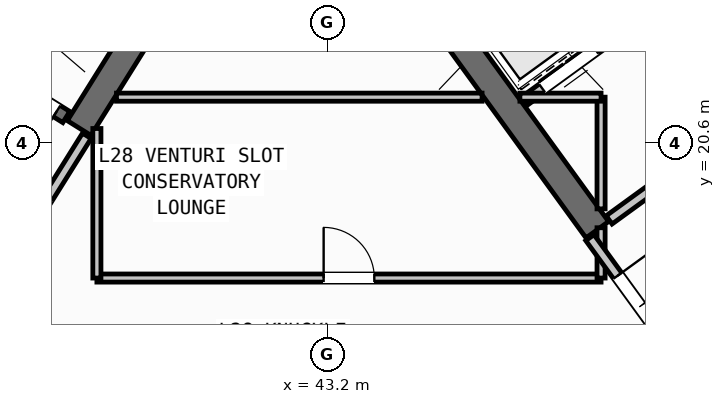
"""IFC4 building model, lengths in metres.
Left out: names, types, materials, properties, quantities, classifications, styles, units other than length and angle.
Written with IfcOpenShell. Run it as: python <this file> out.ifc"""

import sys

from ifc_helpers import new_model, si_unit, direction, frame, frame_2d, origin, place, context, subcontext, project, spatial, rectangle, extrude, source, transform, mapped, element, fill, save


model = new_model("IFC4")
c1 = context("Model", 3, precision=1e-05, world=origin(), true_north=direction((0.0, 1.0)))
c2 = subcontext(c1, "Body", "Model", "MODEL_VIEW")
j1 = project(units=[si_unit("LENGTHUNIT", "METRE"), si_unit("PLANEANGLEUNIT", "RADIAN")], contexts=[c1])
p1 = place(None, origin())
s1 = spatial("IfcSite", under=j1, at=p1, CompositionType="ELEMENT")
p2 = place(p1, origin())
s2 = spatial("IfcBuilding", under=s1, at=p2, CompositionType="ELEMENT")
p3 = place(p2, frame((0.0, 0.0, 112.5)))
s3 = spatial("IfcBuildingStorey", under=s2, at=p3, CompositionType="ELEMENT", Elevation=112.5)
p4 = place(p3, frame((40.194, 23.922, 0.0), z_axis=(0.0, 0.0, 1.0), x_axis=(-0.529888438328, -0.848067357541, 0.0)))
e1 = element("IfcWall", 1, at=p4, inside=s3, PredefinedType="SHEAR", context=c2, shape_type="SweptSolid", body=[
    extrude(rectangle(XDim=3.575, YDim=0.55, at=frame_2d((1.788, 0.0))), origin(), (0.0, 0.0, 1.0), 3.35),
])
p5 = place(p3, frame((48.526, 18.884, 0.0), z_axis=(0.0, 0.0, 1.0), x_axis=(-0.587764933797, 0.809031756236, 0.0)))
e2 = element("IfcWall", 2, at=p5, inside=s3, PredefinedType="SHEAR", context=c2, shape_type="SweptSolid", body=[
    extrude(rectangle(XDim=6.425, YDim=0.55, at=frame_2d((3.212, 0.0))), origin(), (0.0, 0.0, 1.0), 3.35),
])
p6 = place(p3, frame((38.046, 21.108, 0.0), z_axis=(0.0, 0.0, 1.0), x_axis=(-0.848054434086, 0.529909121291, 0.0)))
e3 = element("IfcWall", 3, at=p6, inside=s3, PredefinedType="SHEAR", context=c2, shape_type="SweptSolid", body=[
    extrude(rectangle(XDim=7.33, YDim=0.26, at=frame_2d((3.665, 0.0))), origin(), (0.0, 0.0, 1.0), 3.35),
])
p7 = place(p6, frame((0.22, 0.0, 0.0)))
e4 = element("IfcOpeningElement", 4, at=p7, cuts=e3, PredefinedType="OPENING", context=c2, shape_type="SweptSolid", body=[
    extrude(rectangle(XDim=1.1, YDim=2.1, at=frame_2d((0.55, 1.05))), frame((0.0, 0.14, 0.0), z_axis=(0.0, -1.0, 0.0), x_axis=(1.0, 0.0, 0.0)), (0.0, 0.0, 1.0), 0.28),
])
p8 = place(p3, frame((47.065, 21.407, 0.0), z_axis=(0.0, 0.0, 1.0), x_axis=(0.809032984992, 0.587763242466, 0.0)))
e5 = element("IfcWall", 5, at=p8, inside=s3, PredefinedType="STANDARD", context=c2, shape_type="SweptSolid", body=[
    extrude(rectangle(XDim=3.448, YDim=0.2, at=frame_2d((1.724, 0.0))), origin(), (0.0, 0.0, 1.0), 3.34),
])
p9 = place(p8, frame((0.458, 0.0, 0.0)))
e6 = element("IfcOpeningElement", 6, at=p9, cuts=e5, PredefinedType="OPENING", context=c2, shape_type="SweptSolid", body=[
    extrude(rectangle(XDim=1.3, YDim=2.2, at=frame_2d((0.65, 1.1))), frame((0.0, 0.11, 0.0), z_axis=(0.0, -1.0, 0.0), x_axis=(1.0, 0.0, 0.0)), (0.0, 0.0, 1.0), 0.22),
])
p10 = place(p3, frame((48.758, 19.077, 0.0), z_axis=(0.0, 0.0, 1.0), x_axis=(0.809005065155, 0.587801671104, 0.0)))
e7 = element("IfcWall", 7, at=p10, inside=s3, PredefinedType="STANDARD", context=c2, shape_type="SweptSolid", body=[
    extrude(rectangle(XDim=5.768, YDim=0.2, at=frame_2d((2.884, 0.0))), origin(), (0.0, 0.0, 1.0), 3.34),
])
p11 = place(p10, frame((2.548, 0.0, 0.0)))
e8 = element("IfcOpeningElement", 8, at=p11, cuts=e7, PredefinedType="OPENING", context=c2, shape_type="SweptSolid", body=[
    extrude(rectangle(XDim=1.15, YDim=2.1, at=frame_2d((0.575, 1.05))), frame((0.0, 0.11, 0.0), z_axis=(0.0, -1.0, 0.0), x_axis=(1.0, 0.0, 0.0)), (0.0, 0.0, 1.0), 0.22),
])
p12 = place(p3, frame((38.451, 20.737, 0.0), z_axis=(0.0, 0.0, 1.0), x_axis=(-0.529924799939, -0.848044637038, 0.0)))
e9 = element("IfcWall", 9, at=p12, inside=s3, PredefinedType="STANDARD", context=c2, shape_type="SweptSolid", body=[
    extrude(rectangle(XDim=2.96, YDim=0.2, at=frame_2d((1.48, 0.0))), origin(), (0.0, 0.0, 1.0), 3.34),
])
p13 = place(p12, frame((1.46, 0.0, 0.0)))
e10 = element("IfcOpeningElement", 10, at=p13, cuts=e9, PredefinedType="OPENING", context=c2, shape_type="SweptSolid", body=[
    extrude(rectangle(XDim=0.86, YDim=2.05, at=frame_2d((0.43, 1.025))), frame((0.0, 0.11, 0.0), z_axis=(0.0, -1.0, 0.0), x_axis=(1.0, 0.0, 0.0)), (0.0, 0.0, 1.0), 0.22),
])
p14 = place(p3, frame((38.65, 17.93, 0.0), z_axis=(0.0, 0.0, 1.0), x_axis=(1.0, 0.0, 0.0)))
e11 = element("IfcWall", 11, at=p14, inside=s3, PredefinedType="PARTITIONING", context=c2, shape_type="SweptSolid", body=[
    extrude(rectangle(XDim=9.95, YDim=0.16, at=frame_2d((4.975, 0.0))), origin(), (0.0, 0.0, 1.0), 3.34),
])
p15 = place(p14, frame((4.475, 0.0, 0.0)))
e12 = element("IfcOpeningElement", 12, at=p15, cuts=e11, PredefinedType="OPENING", context=c2, shape_type="SweptSolid", body=[
    extrude(rectangle(XDim=1.0, YDim=2.1, at=frame_2d((0.5, 1.05))), frame((0.0, 0.09, 0.0), z_axis=(0.0, -1.0, 0.0), x_axis=(1.0, 0.0, 0.0)), (0.0, 0.0, 1.0), 0.18),
])
p16 = place(p3, frame((38.65, 17.93, 0.0), z_axis=(0.0, 0.0, 1.0), x_axis=(0.0, 1.0, 0.0)))
e13 = element("IfcWall", 13, at=p16, inside=s3, PredefinedType="PARTITIONING", context=c2, shape_type="SweptSolid", body=[
    extrude(rectangle(XDim=2.951, YDim=0.16, at=frame_2d((1.476, 0.0))), origin(), (0.0, 0.0, 1.0), 3.34),
])
p17 = place(p3, frame((48.6, 17.93, 0.0), z_axis=(0.0, 0.0, 1.0), x_axis=(0.0, 1.0, 0.0)))
e14 = element("IfcWall", 14, at=p17, inside=s3, PredefinedType="PARTITIONING", context=c2, shape_type="SweptSolid", body=[
    extrude(rectangle(XDim=0.993, YDim=0.16, at=frame_2d((0.496, 0.0))), origin(), (0.0, 0.0, 1.0), 3.34),
])
p18 = place(p3, frame((48.6, 19.295, 0.0), z_axis=(0.0, 0.0, 1.0), x_axis=(0.0, 1.0, 0.0)))
e15 = element("IfcWall", 15, at=p18, inside=s3, PredefinedType="PARTITIONING", context=c2, shape_type="SweptSolid", body=[
    extrude(rectangle(XDim=2.205, YDim=0.16, at=frame_2d((1.103, 0.0))), origin(), (0.0, 0.0, 1.0), 3.34),
])
p19 = place(p3, frame((39.037, 21.5, 0.0), z_axis=(0.0, 0.0, 1.0), x_axis=(1.0, 0.0, 0.0)))
e16 = element("IfcWall", 16, at=p19, inside=s3, PredefinedType="PARTITIONING", context=c2, shape_type="SweptSolid", body=[
    extrude(rectangle(XDim=7.215, YDim=0.16, at=frame_2d((3.607, 0.0))), origin(), (0.0, 0.0, 1.0), 3.34),
])
p20 = place(p3, frame((46.998, 21.5, 0.0), z_axis=(0.0, 0.0, 1.0), x_axis=(1.0, 0.0, 0.0)))
e17 = element("IfcWall", 17, at=p20, inside=s3, PredefinedType="PARTITIONING", context=c2, shape_type="SweptSolid", body=[
    extrude(rectangle(XDim=1.602, YDim=0.16, at=frame_2d((0.801, 0.0))), origin(), (0.0, 0.0, 1.0), 3.34),
])
p21 = place(p3, frame((50.119, 16.333, 0.0), z_axis=(0.0, 0.0, 1.0), x_axis=(-0.587749856981, 0.809042709391, 0.0)))
e18 = element("IfcWall", 18, at=p21, inside=s3, PredefinedType="STANDARD", context=c2, shape_type="SweptSolid", body=[
    extrude(rectangle(XDim=2.96, YDim=0.2, at=frame_2d((1.48, 0.0))), origin(), (0.0, 0.0, 1.0), 3.34),
])
p22 = place(p21, frame((0.53, 0.0, 0.0)))
e19 = element("IfcOpeningElement", 19, at=p22, cuts=e18, PredefinedType="OPENING", context=c2, shape_type="SweptSolid", body=[
    extrude(rectangle(XDim=1.5, YDim=2.15, at=frame_2d((0.75, 1.075))), frame((0.0, 0.11, 0.0), z_axis=(0.0, -1.0, 0.0), x_axis=(1.0, 0.0, 0.0)), (0.0, 0.0, 1.0), 0.22),
])
m1 = source(origin(), c2, "Body", "SweptSolid", [
    extrude(rectangle(XDim=1.1, YDim=2.1, at=frame_2d((0.55, 1.05))), frame((0.0, 0.025, 0.0), z_axis=(0.0, -1.0, 0.0), x_axis=(1.0, 0.0, 0.0)), (0.0, 0.0, 1.0), 0.05),
])
p23 = place(p7, origin())
e20 = element("IfcDoor", 20, at=p23, inside=s3, OperationType="SINGLE_SWING_LEFT", PredefinedType="DOOR", context=c2, shape_type="MappedRepresentation", body=[
    mapped(m1, transform((0.0, 0.0, 0.0), scale=1.0)),
])
fill(e4, e20)
m2 = source(origin(), c2, "Body", "SweptSolid", [
    extrude(rectangle(XDim=1.3, YDim=2.2, at=frame_2d((0.65, 1.1))), frame((0.0, 0.025, 0.0), z_axis=(0.0, -1.0, 0.0), x_axis=(1.0, 0.0, 0.0)), (0.0, 0.0, 1.0), 0.05),
])
p24 = place(p9, origin())
e21 = element("IfcDoor", 21, at=p24, inside=s3, OperationType="DOUBLE_DOOR_SLIDING", PredefinedType="DOOR", context=c2, shape_type="MappedRepresentation", body=[
    mapped(m2, transform((0.0, 0.0, 0.0), scale=1.0)),
])
fill(e6, e21)
m3 = source(origin(), c2, "Body", "SweptSolid", [
    extrude(rectangle(XDim=1.0, YDim=2.1, at=frame_2d((0.5, 1.05))), frame((0.0, 0.025, 0.0), z_axis=(0.0, -1.0, 0.0), x_axis=(1.0, 0.0, 0.0)), (0.0, 0.0, 1.0), 0.05),
])
p25 = place(p15, origin())
e22 = element("IfcDoor", 22, at=p25, inside=s3, OperationType="SINGLE_SWING_LEFT", PredefinedType="DOOR", context=c2, shape_type="MappedRepresentation", body=[
    mapped(m3, transform((0.0, 0.0, 0.0), scale=1.0)),
])
fill(e12, e22)
m4 = source(origin(), c2, "Body", "SweptSolid", [
    extrude(rectangle(XDim=1.5, YDim=2.15, at=frame_2d((0.75, 1.075))), frame((0.0, 0.025, 0.0), z_axis=(0.0, -1.0, 0.0), x_axis=(1.0, 0.0, 0.0)), (0.0, 0.0, 1.0), 0.05),
])
p26 = place(p22, frame((1.5, 0.0, 0.0), z_axis=(0.0, 0.0, 1.0), x_axis=(-1.0, 0.0, 0.0)))
e23 = element("IfcDoor", 23, at=p26, inside=s3, OperationType="DOUBLE_DOOR_SINGLE_SWING", PredefinedType="DOOR", context=c2, shape_type="MappedRepresentation", body=[
    mapped(m4, transform((0.0, 0.0, 0.0), scale=1.0)),
])
fill(e19, e23)
save(model, sys.argv[1])
